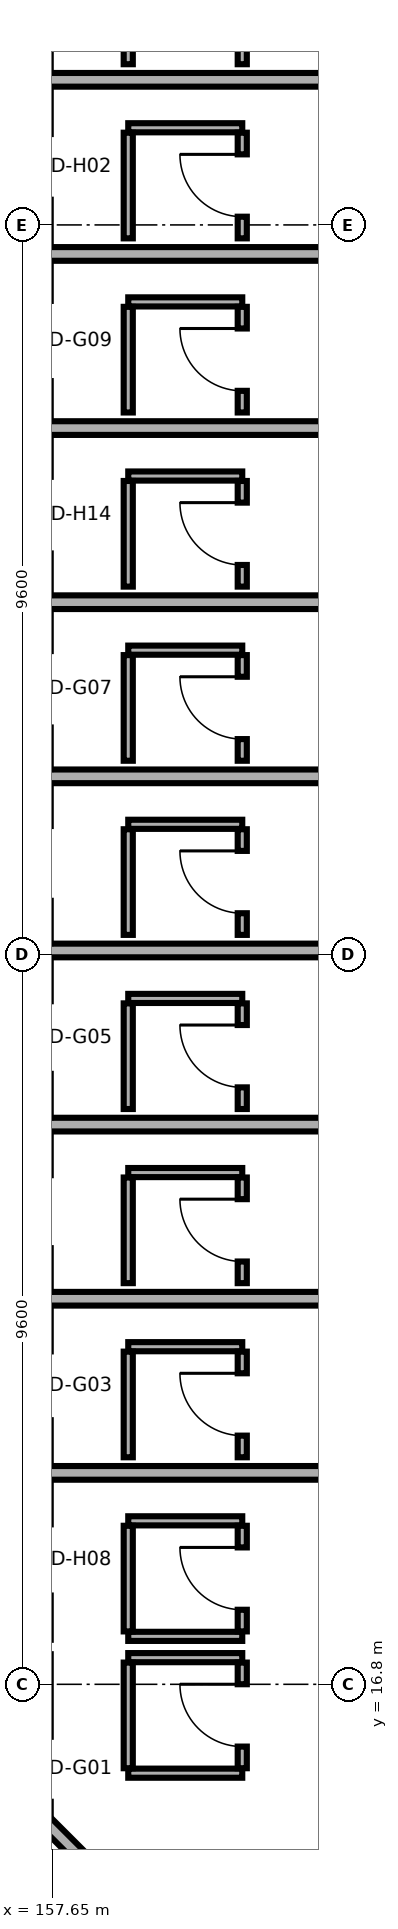
"""IFC4 building model, lengths in metres.
Left out: names, types, materials, properties, quantities, classifications, styles, units other than length and angle.
Written with IfcOpenShell. Run it as: python <this file> out.ifc"""

import sys

from ifc_helpers import new_model, si_unit, direction, frame, frame_2d, origin, place, context, subcontext, project, spatial, rectangle, extrude, element, fill, save


model = new_model("IFC4")
c1 = context("Model", 3, precision=1e-05, world=origin(), true_north=direction((0.0, 1.0)))
c2 = subcontext(c1, "Body", "Model", "MODEL_VIEW")
j1 = project(units=[si_unit("LENGTHUNIT", "METRE"), si_unit("PLANEANGLEUNIT", "RADIAN")], contexts=[c1])
p1 = place(None, origin())
s1 = spatial("IfcSite", under=j1, at=p1, CompositionType="ELEMENT")
p2 = place(p1, origin())
s2 = spatial("IfcBuilding", under=s1, at=p2, CompositionType="ELEMENT")
p3 = place(p2, frame((0.0, 0.0, 28.3)))
s3 = spatial("IfcBuildingStorey", under=s2, at=p3, CompositionType="ELEMENT", Elevation=28.3)
p4 = place(p3, frame((157.55, 15.0, 0.0), z_axis=(0.0, 0.0, 1.0), x_axis=(0.707106781187, -0.707106781187, 0.0)))
e1 = element("IfcWall", 1, at=p4, inside=s3, PredefinedType="PARTITIONING", context=c2, shape_type="SweptSolid", body=[
    extrude(rectangle(XDim=4.844, YDim=0.18, at=frame_2d((2.422, 0.0))), origin(), (0.0, 0.0, 1.0), 2.66),
])
for number, where, z_axis, x_axis in (
    (2, (158.65, 15.631, 0.0), (0.0, 0.0, 1.0), (1.0, 0.0, 0.0)),
    (3, (158.65, 17.151, 0.0), (0.0, 0.0, 1.0), (1.0, 0.0, 0.0)),
):
    element("IfcWall", number, at=place(p3, frame(where, z_axis=z_axis, x_axis=x_axis)), inside=s3, PredefinedType="PARTITIONING", context=c2, shape_type="SweptSolid", body=[
        extrude(rectangle(XDim=1.5, YDim=0.12, at=frame_2d((0.75, 0.0))), origin(), (0.0, 0.0, 1.0), 3.175),
    ])
p5 = place(p3, frame((158.65, 15.696, 0.0), z_axis=(0.0, 0.0, 1.0), x_axis=(0.0, 1.0, 0.0)))
e4 = element("IfcWall", 4, at=p5, inside=s3, PredefinedType="PARTITIONING", context=c2, shape_type="SweptSolid", body=[
    extrude(rectangle(XDim=1.39, YDim=0.12, at=frame_2d((0.695, 0.0))), origin(), (0.0, 0.0, 1.0), 2.71),
])
p6 = place(p3, frame((160.15, 15.696, 0.0), z_axis=(0.0, 0.0, 1.0), x_axis=(0.0, 1.0, 0.0)))
e5 = element("IfcWall", 5, at=p6, inside=s3, PredefinedType="PARTITIONING", context=c2, shape_type="SweptSolid", body=[
    extrude(rectangle(XDim=1.39, YDim=0.12, at=frame_2d((0.695, 0.0))), origin(), (0.0, 0.0, 1.0), 2.71),
])
p7 = place(p6, frame((0.285, 0.0, 0.0)))
e6 = element("IfcOpeningElement", 6, at=p7, cuts=e5, PredefinedType="OPENING", context=c2, shape_type="SweptSolid", body=[
    extrude(rectangle(XDim=0.82, YDim=2.08, at=frame_2d((0.41, 1.04))), frame((0.0, 0.07, 0.0), z_axis=(0.0, -1.0, 0.0), x_axis=(1.0, 0.0, 0.0)), (0.0, 0.0, 1.0), 0.14),
])
for number, where, z_axis, x_axis in (
    (7, (158.65, 17.431, 0.0), (0.0, 0.0, 1.0), (1.0, 0.0, 0.0)),
    (8, (158.65, 18.951, 0.0), (0.0, 0.0, 1.0), (1.0, 0.0, 0.0)),
):
    element("IfcWall", number, at=place(p3, frame(where, z_axis=z_axis, x_axis=x_axis)), inside=s3, PredefinedType="PARTITIONING", context=c2, shape_type="SweptSolid", body=[
        extrude(rectangle(XDim=1.5, YDim=0.12, at=frame_2d((0.75, 0.0))), origin(), (0.0, 0.0, 1.0), 3.175),
    ])
p8 = place(p3, frame((158.65, 17.496, 0.0), z_axis=(0.0, 0.0, 1.0), x_axis=(0.0, 1.0, 0.0)))
e9 = element("IfcWall", 9, at=p8, inside=s3, PredefinedType="PARTITIONING", context=c2, shape_type="SweptSolid", body=[
    extrude(rectangle(XDim=1.39, YDim=0.12, at=frame_2d((0.695, 0.0))), origin(), (0.0, 0.0, 1.0), 3.175),
])
p9 = place(p3, frame((160.15, 17.496, 0.0), z_axis=(0.0, 0.0, 1.0), x_axis=(0.0, 1.0, 0.0)))
e10 = element("IfcWall", 10, at=p9, inside=s3, PredefinedType="PARTITIONING", context=c2, shape_type="SweptSolid", body=[
    extrude(rectangle(XDim=1.39, YDim=0.12, at=frame_2d((0.695, 0.0))), origin(), (0.0, 0.0, 1.0), 3.175),
])
p10 = place(p9, frame((0.285, 0.0, 0.0)))
e11 = element("IfcOpeningElement", 11, at=p10, cuts=e10, PredefinedType="OPENING", context=c2, shape_type="SweptSolid", body=[
    extrude(rectangle(XDim=0.82, YDim=2.08, at=frame_2d((0.41, 1.04))), frame((0.0, 0.07, 0.0), z_axis=(0.0, -1.0, 0.0), x_axis=(1.0, 0.0, 0.0)), (0.0, 0.0, 1.0), 0.14),
])
p11 = place(p3, frame((157.55, 19.582, 0.0), z_axis=(0.0, 0.0, 1.0), x_axis=(1.0, 0.0, 0.0)))
e12 = element("IfcWall", 12, at=p11, inside=s3, PredefinedType="PARTITIONING", context=c2, shape_type="SweptSolid", body=[
    extrude(rectangle(XDim=8.08, YDim=0.18, at=frame_2d((4.04, 0.0))), origin(), (0.0, 0.0, 1.0), 2.66),
])
p12 = place(p3, frame((158.65, 21.242, 0.0), z_axis=(0.0, 0.0, 1.0), x_axis=(1.0, 0.0, 0.0)))
e13 = element("IfcWall", 13, at=p12, inside=s3, PredefinedType="PARTITIONING", context=c2, shape_type="SweptSolid", body=[
    extrude(rectangle(XDim=1.5, YDim=0.12, at=frame_2d((0.75, 0.0))), origin(), (0.0, 0.0, 1.0), 3.175),
])
p13 = place(p3, frame((158.65, 19.787, 0.0), z_axis=(0.0, 0.0, 1.0), x_axis=(0.0, 1.0, 0.0)))
e14 = element("IfcWall", 14, at=p13, inside=s3, PredefinedType="PARTITIONING", context=c2, shape_type="SweptSolid", body=[
    extrude(rectangle(XDim=1.39, YDim=0.12, at=frame_2d((0.695, 0.0))), origin(), (0.0, 0.0, 1.0), 3.175),
])
p14 = place(p3, frame((160.15, 19.787, 0.0), z_axis=(0.0, 0.0, 1.0), x_axis=(0.0, 1.0, 0.0)))
e15 = element("IfcWall", 15, at=p14, inside=s3, PredefinedType="PARTITIONING", context=c2, shape_type="SweptSolid", body=[
    extrude(rectangle(XDim=1.39, YDim=0.12, at=frame_2d((0.695, 0.0))), origin(), (0.0, 0.0, 1.0), 3.175),
])
p15 = place(p14, frame((0.285, 0.0, 0.0)))
e16 = element("IfcOpeningElement", 16, at=p15, cuts=e15, PredefinedType="OPENING", context=c2, shape_type="SweptSolid", body=[
    extrude(rectangle(XDim=0.82, YDim=2.08, at=frame_2d((0.41, 1.04))), frame((0.0, 0.07, 0.0), z_axis=(0.0, -1.0, 0.0), x_axis=(1.0, 0.0, 0.0)), (0.0, 0.0, 1.0), 0.14),
])
p16 = place(p3, frame((157.55, 21.873, 0.0), z_axis=(0.0, 0.0, 1.0), x_axis=(1.0, 0.0, 0.0)))
e17 = element("IfcWall", 17, at=p16, inside=s3, PredefinedType="PARTITIONING", context=c2, shape_type="SweptSolid", body=[
    extrude(rectangle(XDim=8.569, YDim=0.18, at=frame_2d((4.284, 0.0))), origin(), (0.0, 0.0, 1.0), 2.66),
])
p17 = place(p3, frame((158.65, 23.533, 0.0), z_axis=(0.0, 0.0, 1.0), x_axis=(1.0, 0.0, 0.0)))
e18 = element("IfcWall", 18, at=p17, inside=s3, PredefinedType="PARTITIONING", context=c2, shape_type="SweptSolid", body=[
    extrude(rectangle(XDim=1.5, YDim=0.12, at=frame_2d((0.75, 0.0))), origin(), (0.0, 0.0, 1.0), 3.175),
])
p18 = place(p3, frame((158.65, 22.078, 0.0), z_axis=(0.0, 0.0, 1.0), x_axis=(0.0, 1.0, 0.0)))
e19 = element("IfcWall", 19, at=p18, inside=s3, PredefinedType="PARTITIONING", context=c2, shape_type="SweptSolid", body=[
    extrude(rectangle(XDim=1.39, YDim=0.12, at=frame_2d((0.695, 0.0))), origin(), (0.0, 0.0, 1.0), 3.175),
])
p19 = place(p3, frame((160.15, 22.078, 0.0), z_axis=(0.0, 0.0, 1.0), x_axis=(0.0, 1.0, 0.0)))
e20 = element("IfcWall", 20, at=p19, inside=s3, PredefinedType="PARTITIONING", context=c2, shape_type="SweptSolid", body=[
    extrude(rectangle(XDim=1.39, YDim=0.12, at=frame_2d((0.695, 0.0))), origin(), (0.0, 0.0, 1.0), 3.175),
])
p20 = place(p19, frame((0.285, 0.0, 0.0)))
e21 = element("IfcOpeningElement", 21, at=p20, cuts=e20, PredefinedType="OPENING", context=c2, shape_type="SweptSolid", body=[
    extrude(rectangle(XDim=0.82, YDim=2.08, at=frame_2d((0.41, 1.04))), frame((0.0, 0.07, 0.0), z_axis=(0.0, -1.0, 0.0), x_axis=(1.0, 0.0, 0.0)), (0.0, 0.0, 1.0), 0.14),
])
p21 = place(p3, frame((157.55, 24.164, 0.0), z_axis=(0.0, 0.0, 1.0), x_axis=(1.0, 0.0, 0.0)))
e22 = element("IfcWall", 22, at=p21, inside=s3, PredefinedType="PARTITIONING", context=c2, shape_type="SweptSolid", body=[
    extrude(rectangle(XDim=8.794, YDim=0.18, at=frame_2d((4.397, 0.0))), origin(), (0.0, 0.0, 1.0), 2.66),
])
p22 = place(p3, frame((158.65, 25.823, 0.0), z_axis=(0.0, 0.0, 1.0), x_axis=(1.0, 0.0, 0.0)))
e23 = element("IfcWall", 23, at=p22, inside=s3, PredefinedType="PARTITIONING", context=c2, shape_type="SweptSolid", body=[
    extrude(rectangle(XDim=1.5, YDim=0.12, at=frame_2d((0.75, 0.0))), origin(), (0.0, 0.0, 1.0), 3.175),
])
p23 = place(p3, frame((158.65, 24.369, 0.0), z_axis=(0.0, 0.0, 1.0), x_axis=(0.0, 1.0, 0.0)))
e24 = element("IfcWall", 24, at=p23, inside=s3, PredefinedType="PARTITIONING", context=c2, shape_type="SweptSolid", body=[
    extrude(rectangle(XDim=1.39, YDim=0.12, at=frame_2d((0.695, 0.0))), origin(), (0.0, 0.0, 1.0), 3.175),
])
p24 = place(p3, frame((160.15, 24.369, 0.0), z_axis=(0.0, 0.0, 1.0), x_axis=(0.0, 1.0, 0.0)))
e25 = element("IfcWall", 25, at=p24, inside=s3, PredefinedType="PARTITIONING", context=c2, shape_type="SweptSolid", body=[
    extrude(rectangle(XDim=1.39, YDim=0.12, at=frame_2d((0.695, 0.0))), origin(), (0.0, 0.0, 1.0), 3.175),
])
p25 = place(p24, frame((0.285, 0.0, 0.0)))
e26 = element("IfcOpeningElement", 26, at=p25, cuts=e25, PredefinedType="OPENING", context=c2, shape_type="SweptSolid", body=[
    extrude(rectangle(XDim=0.82, YDim=2.08, at=frame_2d((0.41, 1.04))), frame((0.0, 0.07, 0.0), z_axis=(0.0, -1.0, 0.0), x_axis=(1.0, 0.0, 0.0)), (0.0, 0.0, 1.0), 0.14),
])
p26 = place(p3, frame((157.55, 26.455, 0.0), z_axis=(0.0, 0.0, 1.0), x_axis=(1.0, 0.0, 0.0)))
e27 = element("IfcWall", 27, at=p26, inside=s3, PredefinedType="PARTITIONING", context=c2, shape_type="SweptSolid", body=[
    extrude(rectangle(XDim=8.814, YDim=0.18, at=frame_2d((4.407, 0.0))), origin(), (0.0, 0.0, 1.0), 2.66),
])
p27 = place(p3, frame((158.65, 28.115, 0.0), z_axis=(0.0, 0.0, 1.0), x_axis=(1.0, 0.0, 0.0)))
e28 = element("IfcWall", 28, at=p27, inside=s3, PredefinedType="PARTITIONING", context=c2, shape_type="SweptSolid", body=[
    extrude(rectangle(XDim=1.5, YDim=0.12, at=frame_2d((0.75, 0.0))), origin(), (0.0, 0.0, 1.0), 3.175),
])
p28 = place(p3, frame((158.65, 26.659, 0.0), z_axis=(0.0, 0.0, 1.0), x_axis=(0.0, 1.0, 0.0)))
e29 = element("IfcWall", 29, at=p28, inside=s3, PredefinedType="PARTITIONING", context=c2, shape_type="SweptSolid", body=[
    extrude(rectangle(XDim=1.39, YDim=0.12, at=frame_2d((0.695, 0.0))), origin(), (0.0, 0.0, 1.0), 3.175),
])
p29 = place(p3, frame((160.15, 26.659, 0.0), z_axis=(0.0, 0.0, 1.0), x_axis=(0.0, 1.0, 0.0)))
e30 = element("IfcWall", 30, at=p29, inside=s3, PredefinedType="PARTITIONING", context=c2, shape_type="SweptSolid", body=[
    extrude(rectangle(XDim=1.39, YDim=0.12, at=frame_2d((0.695, 0.0))), origin(), (0.0, 0.0, 1.0), 3.175),
])
p30 = place(p29, frame((0.285, 0.0, 0.0)))
e31 = element("IfcOpeningElement", 31, at=p30, cuts=e30, PredefinedType="OPENING", context=c2, shape_type="SweptSolid", body=[
    extrude(rectangle(XDim=0.82, YDim=2.08, at=frame_2d((0.41, 1.04))), frame((0.0, 0.07, 0.0), z_axis=(0.0, -1.0, 0.0), x_axis=(1.0, 0.0, 0.0)), (0.0, 0.0, 1.0), 0.14),
])
p31 = place(p3, frame((157.55, 28.746, 0.0), z_axis=(0.0, 0.0, 1.0), x_axis=(1.0, 0.0, 0.0)))
e32 = element("IfcWall", 32, at=p31, inside=s3, PredefinedType="PARTITIONING", context=c2, shape_type="SweptSolid", body=[
    extrude(rectangle(XDim=8.814, YDim=0.18, at=frame_2d((4.407, 0.0))), origin(), (0.0, 0.0, 1.0), 2.66),
])
p32 = place(p3, frame((158.65, 30.406, 0.0), z_axis=(0.0, 0.0, 1.0), x_axis=(1.0, 0.0, 0.0)))
e33 = element("IfcWall", 33, at=p32, inside=s3, PredefinedType="PARTITIONING", context=c2, shape_type="SweptSolid", body=[
    extrude(rectangle(XDim=1.5, YDim=0.12, at=frame_2d((0.75, 0.0))), origin(), (0.0, 0.0, 1.0), 3.175),
])
p33 = place(p3, frame((158.65, 28.95, 0.0), z_axis=(0.0, 0.0, 1.0), x_axis=(0.0, 1.0, 0.0)))
e34 = element("IfcWall", 34, at=p33, inside=s3, PredefinedType="PARTITIONING", context=c2, shape_type="SweptSolid", body=[
    extrude(rectangle(XDim=1.39, YDim=0.12, at=frame_2d((0.695, 0.0))), origin(), (0.0, 0.0, 1.0), 3.175),
])
p34 = place(p3, frame((160.15, 28.95, 0.0), z_axis=(0.0, 0.0, 1.0), x_axis=(0.0, 1.0, 0.0)))
e35 = element("IfcWall", 35, at=p34, inside=s3, PredefinedType="PARTITIONING", context=c2, shape_type="SweptSolid", body=[
    extrude(rectangle(XDim=1.39, YDim=0.12, at=frame_2d((0.695, 0.0))), origin(), (0.0, 0.0, 1.0), 3.175),
])
p35 = place(p34, frame((0.285, 0.0, 0.0)))
e36 = element("IfcOpeningElement", 36, at=p35, cuts=e35, PredefinedType="OPENING", context=c2, shape_type="SweptSolid", body=[
    extrude(rectangle(XDim=0.82, YDim=2.08, at=frame_2d((0.41, 1.04))), frame((0.0, 0.07, 0.0), z_axis=(0.0, -1.0, 0.0), x_axis=(1.0, 0.0, 0.0)), (0.0, 0.0, 1.0), 0.14),
])
p36 = place(p3, frame((157.55, 31.036, 0.0), z_axis=(0.0, 0.0, 1.0), x_axis=(1.0, 0.0, 0.0)))
e37 = element("IfcWall", 37, at=p36, inside=s3, PredefinedType="PARTITIONING", context=c2, shape_type="SweptSolid", body=[
    extrude(rectangle(XDim=8.794, YDim=0.18, at=frame_2d((4.397, 0.0))), origin(), (0.0, 0.0, 1.0), 2.66),
])
p37 = place(p3, frame((158.65, 32.696, 0.0), z_axis=(0.0, 0.0, 1.0), x_axis=(1.0, 0.0, 0.0)))
e38 = element("IfcWall", 38, at=p37, inside=s3, PredefinedType="PARTITIONING", context=c2, shape_type="SweptSolid", body=[
    extrude(rectangle(XDim=1.5, YDim=0.12, at=frame_2d((0.75, 0.0))), origin(), (0.0, 0.0, 1.0), 3.175),
])
p38 = place(p3, frame((158.65, 31.241, 0.0), z_axis=(0.0, 0.0, 1.0), x_axis=(0.0, 1.0, 0.0)))
e39 = element("IfcWall", 39, at=p38, inside=s3, PredefinedType="PARTITIONING", context=c2, shape_type="SweptSolid", body=[
    extrude(rectangle(XDim=1.39, YDim=0.12, at=frame_2d((0.695, 0.0))), origin(), (0.0, 0.0, 1.0), 2.71),
])
p39 = place(p3, frame((160.15, 31.241, 0.0), z_axis=(0.0, 0.0, 1.0), x_axis=(0.0, 1.0, 0.0)))
e40 = element("IfcWall", 40, at=p39, inside=s3, PredefinedType="PARTITIONING", context=c2, shape_type="SweptSolid", body=[
    extrude(rectangle(XDim=1.39, YDim=0.12, at=frame_2d((0.695, 0.0))), origin(), (0.0, 0.0, 1.0), 2.71),
])
p40 = place(p39, frame((0.285, 0.0, 0.0)))
e41 = element("IfcOpeningElement", 41, at=p40, cuts=e40, PredefinedType="OPENING", context=c2, shape_type="SweptSolid", body=[
    extrude(rectangle(XDim=0.82, YDim=2.08, at=frame_2d((0.41, 1.04))), frame((0.0, 0.07, 0.0), z_axis=(0.0, -1.0, 0.0), x_axis=(1.0, 0.0, 0.0)), (0.0, 0.0, 1.0), 0.14),
])
p41 = place(p3, frame((157.55, 33.327, 0.0), z_axis=(0.0, 0.0, 1.0), x_axis=(1.0, 0.0, 0.0)))
e42 = element("IfcWall", 42, at=p41, inside=s3, PredefinedType="PARTITIONING", context=c2, shape_type="SweptSolid", body=[
    extrude(rectangle(XDim=8.569, YDim=0.18, at=frame_2d((4.284, 0.0))), origin(), (0.0, 0.0, 1.0), 2.66),
])
p42 = place(p3, frame((158.65, 34.987, 0.0), z_axis=(0.0, 0.0, 1.0), x_axis=(1.0, 0.0, 0.0)))
e43 = element("IfcWall", 43, at=p42, inside=s3, PredefinedType="PARTITIONING", context=c2, shape_type="SweptSolid", body=[
    extrude(rectangle(XDim=1.5, YDim=0.12, at=frame_2d((0.75, 0.0))), origin(), (0.0, 0.0, 1.0), 3.175),
])
p43 = place(p3, frame((158.65, 33.532, 0.0), z_axis=(0.0, 0.0, 1.0), x_axis=(0.0, 1.0, 0.0)))
e44 = element("IfcWall", 44, at=p43, inside=s3, PredefinedType="PARTITIONING", context=c2, shape_type="SweptSolid", body=[
    extrude(rectangle(XDim=1.39, YDim=0.12, at=frame_2d((0.695, 0.0))), origin(), (0.0, 0.0, 1.0), 3.175),
])
p44 = place(p3, frame((160.15, 33.532, 0.0), z_axis=(0.0, 0.0, 1.0), x_axis=(0.0, 1.0, 0.0)))
e45 = element("IfcWall", 45, at=p44, inside=s3, PredefinedType="PARTITIONING", context=c2, shape_type="SweptSolid", body=[
    extrude(rectangle(XDim=1.39, YDim=0.12, at=frame_2d((0.695, 0.0))), origin(), (0.0, 0.0, 1.0), 3.175),
])
p45 = place(p44, frame((0.285, 0.0, 0.0)))
e46 = element("IfcOpeningElement", 46, at=p45, cuts=e45, PredefinedType="OPENING", context=c2, shape_type="SweptSolid", body=[
    extrude(rectangle(XDim=0.82, YDim=2.08, at=frame_2d((0.41, 1.04))), frame((0.0, 0.07, 0.0), z_axis=(0.0, -1.0, 0.0), x_axis=(1.0, 0.0, 0.0)), (0.0, 0.0, 1.0), 0.14),
])
p46 = place(p3, frame((157.55, 35.618, 0.0), z_axis=(0.0, 0.0, 1.0), x_axis=(1.0, 0.0, 0.0)))
e47 = element("IfcWall", 47, at=p46, inside=s3, PredefinedType="PARTITIONING", context=c2, shape_type="SweptSolid", body=[
    extrude(rectangle(XDim=8.08, YDim=0.18, at=frame_2d((4.04, 0.0))), origin(), (0.0, 0.0, 1.0), 2.66),
])
p47 = place(p3, frame((158.65, 37.278, 0.0), z_axis=(0.0, 0.0, 1.0), x_axis=(1.0, 0.0, 0.0)))
e48 = element("IfcWall", 48, at=p47, inside=s3, PredefinedType="PARTITIONING", context=c2, shape_type="SweptSolid", body=[
    extrude(rectangle(XDim=1.5, YDim=0.12, at=frame_2d((0.75, 0.0))), origin(), (0.0, 0.0, 1.0), 3.175),
])
p48 = place(p3, frame((158.65, 35.823, 0.0), z_axis=(0.0, 0.0, 1.0), x_axis=(0.0, 1.0, 0.0)))
e49 = element("IfcWall", 49, at=p48, inside=s3, PredefinedType="PARTITIONING", context=c2, shape_type="SweptSolid", body=[
    extrude(rectangle(XDim=1.39, YDim=0.12, at=frame_2d((0.695, 0.0))), origin(), (0.0, 0.0, 1.0), 3.175),
])
p49 = place(p3, frame((160.15, 35.823, 0.0), z_axis=(0.0, 0.0, 1.0), x_axis=(0.0, 1.0, 0.0)))
e50 = element("IfcWall", 50, at=p49, inside=s3, PredefinedType="PARTITIONING", context=c2, shape_type="SweptSolid", body=[
    extrude(rectangle(XDim=1.39, YDim=0.12, at=frame_2d((0.695, 0.0))), origin(), (0.0, 0.0, 1.0), 3.175),
])
p50 = place(p49, frame((0.285, 0.0, 0.0)))
e51 = element("IfcOpeningElement", 51, at=p50, cuts=e50, PredefinedType="OPENING", context=c2, shape_type="SweptSolid", body=[
    extrude(rectangle(XDim=0.82, YDim=2.08, at=frame_2d((0.41, 1.04))), frame((0.0, 0.07, 0.0), z_axis=(0.0, -1.0, 0.0), x_axis=(1.0, 0.0, 0.0)), (0.0, 0.0, 1.0), 0.14),
])
p51 = place(p3, frame((157.55, 37.909, 0.0), z_axis=(0.0, 0.0, 1.0), x_axis=(1.0, 0.0, 0.0)))
e52 = element("IfcWall", 52, at=p51, inside=s3, PredefinedType="PARTITIONING", context=c2, shape_type="SweptSolid", body=[
    extrude(rectangle(XDim=7.336, YDim=0.18, at=frame_2d((3.668, 0.0))), origin(), (0.0, 0.0, 1.0), 2.66),
])
p52 = place(p3, frame((158.65, 38.114, 0.0), z_axis=(0.0, 0.0, 1.0), x_axis=(0.0, 1.0, 0.0)))
e53 = element("IfcWall", 53, at=p52, inside=s3, PredefinedType="PARTITIONING", context=c2, shape_type="SweptSolid", body=[
    extrude(rectangle(XDim=1.39, YDim=0.12, at=frame_2d((0.695, 0.0))), origin(), (0.0, 0.0, 1.0), 2.71),
])
p53 = place(p3, frame((160.15, 38.114, 0.0), z_axis=(0.0, 0.0, 1.0), x_axis=(0.0, 1.0, 0.0)))
e54 = element("IfcWall", 54, at=p53, inside=s3, PredefinedType="PARTITIONING", context=c2, shape_type="SweptSolid", body=[
    extrude(rectangle(XDim=1.39, YDim=0.12, at=frame_2d((0.695, 0.0))), origin(), (0.0, 0.0, 1.0), 2.71),
])
p54 = place(p53, frame((0.285, 0.0, 0.0)))
e55 = element("IfcOpeningElement", 55, at=p54, cuts=e54, PredefinedType="OPENING", context=c2, shape_type="SweptSolid", body=[
    extrude(rectangle(XDim=0.82, YDim=2.08, at=frame_2d((0.41, 1.04))), frame((0.0, 0.07, 0.0), z_axis=(0.0, -1.0, 0.0), x_axis=(1.0, 0.0, 0.0)), (0.0, 0.0, 1.0), 0.14),
])
p55 = place(p7, origin())
e56 = element("IfcDoor", 56, at=p55, inside=s3, OperationType="SINGLE_SWING_RIGHT", PredefinedType="DOOR", context=c2, shape_type="SweptSolid", body=[
    extrude(rectangle(XDim=0.82, YDim=2.08, at=frame_2d((0.41, 1.04))), frame((0.0, 0.025, 0.0), z_axis=(0.0, -1.0, 0.0), x_axis=(1.0, 0.0, 0.0)), (0.0, 0.0, 1.0), 0.05),
])
fill(e6, e56)
p56 = place(p10, origin())
e57 = element("IfcDoor", 57, at=p56, inside=s3, OperationType="SINGLE_SWING_RIGHT", PredefinedType="DOOR", context=c2, shape_type="SweptSolid", body=[
    extrude(rectangle(XDim=0.82, YDim=2.08, at=frame_2d((0.41, 1.04))), frame((0.0, 0.025, 0.0), z_axis=(0.0, -1.0, 0.0), x_axis=(1.0, 0.0, 0.0)), (0.0, 0.0, 1.0), 0.05),
])
fill(e11, e57)
p57 = place(p15, origin())
e58 = element("IfcDoor", 58, at=p57, inside=s3, OperationType="SINGLE_SWING_RIGHT", PredefinedType="DOOR", context=c2, shape_type="SweptSolid", body=[
    extrude(rectangle(XDim=0.82, YDim=2.08, at=frame_2d((0.41, 1.04))), frame((0.0, 0.025, 0.0), z_axis=(0.0, -1.0, 0.0), x_axis=(1.0, 0.0, 0.0)), (0.0, 0.0, 1.0), 0.05),
])
fill(e16, e58)
p58 = place(p20, origin())
e59 = element("IfcDoor", 59, at=p58, inside=s3, OperationType="SINGLE_SWING_RIGHT", PredefinedType="DOOR", context=c2, shape_type="SweptSolid", body=[
    extrude(rectangle(XDim=0.82, YDim=2.08, at=frame_2d((0.41, 1.04))), frame((0.0, 0.025, 0.0), z_axis=(0.0, -1.0, 0.0), x_axis=(1.0, 0.0, 0.0)), (0.0, 0.0, 1.0), 0.05),
])
fill(e21, e59)
p59 = place(p25, origin())
e60 = element("IfcDoor", 60, at=p59, inside=s3, OperationType="SINGLE_SWING_RIGHT", PredefinedType="DOOR", context=c2, shape_type="SweptSolid", body=[
    extrude(rectangle(XDim=0.82, YDim=2.08, at=frame_2d((0.41, 1.04))), frame((0.0, 0.025, 0.0), z_axis=(0.0, -1.0, 0.0), x_axis=(1.0, 0.0, 0.0)), (0.0, 0.0, 1.0), 0.05),
])
fill(e26, e60)
p60 = place(p30, origin())
e61 = element("IfcDoor", 61, at=p60, inside=s3, OperationType="SINGLE_SWING_RIGHT", PredefinedType="DOOR", context=c2, shape_type="SweptSolid", body=[
    extrude(rectangle(XDim=0.82, YDim=2.08, at=frame_2d((0.41, 1.04))), frame((0.0, 0.025, 0.0), z_axis=(0.0, -1.0, 0.0), x_axis=(1.0, 0.0, 0.0)), (0.0, 0.0, 1.0), 0.05),
])
fill(e31, e61)
p61 = place(p35, origin())
e62 = element("IfcDoor", 62, at=p61, inside=s3, OperationType="SINGLE_SWING_RIGHT", PredefinedType="DOOR", context=c2, shape_type="SweptSolid", body=[
    extrude(rectangle(XDim=0.82, YDim=2.08, at=frame_2d((0.41, 1.04))), frame((0.0, 0.025, 0.0), z_axis=(0.0, -1.0, 0.0), x_axis=(1.0, 0.0, 0.0)), (0.0, 0.0, 1.0), 0.05),
])
fill(e36, e62)
p62 = place(p40, origin())
e63 = element("IfcDoor", 63, at=p62, inside=s3, OperationType="SINGLE_SWING_RIGHT", PredefinedType="DOOR", context=c2, shape_type="SweptSolid", body=[
    extrude(rectangle(XDim=0.82, YDim=2.08, at=frame_2d((0.41, 1.04))), frame((0.0, 0.025, 0.0), z_axis=(0.0, -1.0, 0.0), x_axis=(1.0, 0.0, 0.0)), (0.0, 0.0, 1.0), 0.05),
])
fill(e41, e63)
p63 = place(p45, origin())
e64 = element("IfcDoor", 64, at=p63, inside=s3, OperationType="SINGLE_SWING_RIGHT", PredefinedType="DOOR", context=c2, shape_type="SweptSolid", body=[
    extrude(rectangle(XDim=0.82, YDim=2.08, at=frame_2d((0.41, 1.04))), frame((0.0, 0.025, 0.0), z_axis=(0.0, -1.0, 0.0), x_axis=(1.0, 0.0, 0.0)), (0.0, 0.0, 1.0), 0.05),
])
fill(e46, e64)
p64 = place(p50, origin())
e65 = element("IfcDoor", 65, at=p64, inside=s3, OperationType="SINGLE_SWING_RIGHT", PredefinedType="DOOR", context=c2, shape_type="SweptSolid", body=[
    extrude(rectangle(XDim=0.82, YDim=2.08, at=frame_2d((0.41, 1.04))), frame((0.0, 0.025, 0.0), z_axis=(0.0, -1.0, 0.0), x_axis=(1.0, 0.0, 0.0)), (0.0, 0.0, 1.0), 0.05),
])
fill(e51, e65)
save(model, sys.argv[1])
